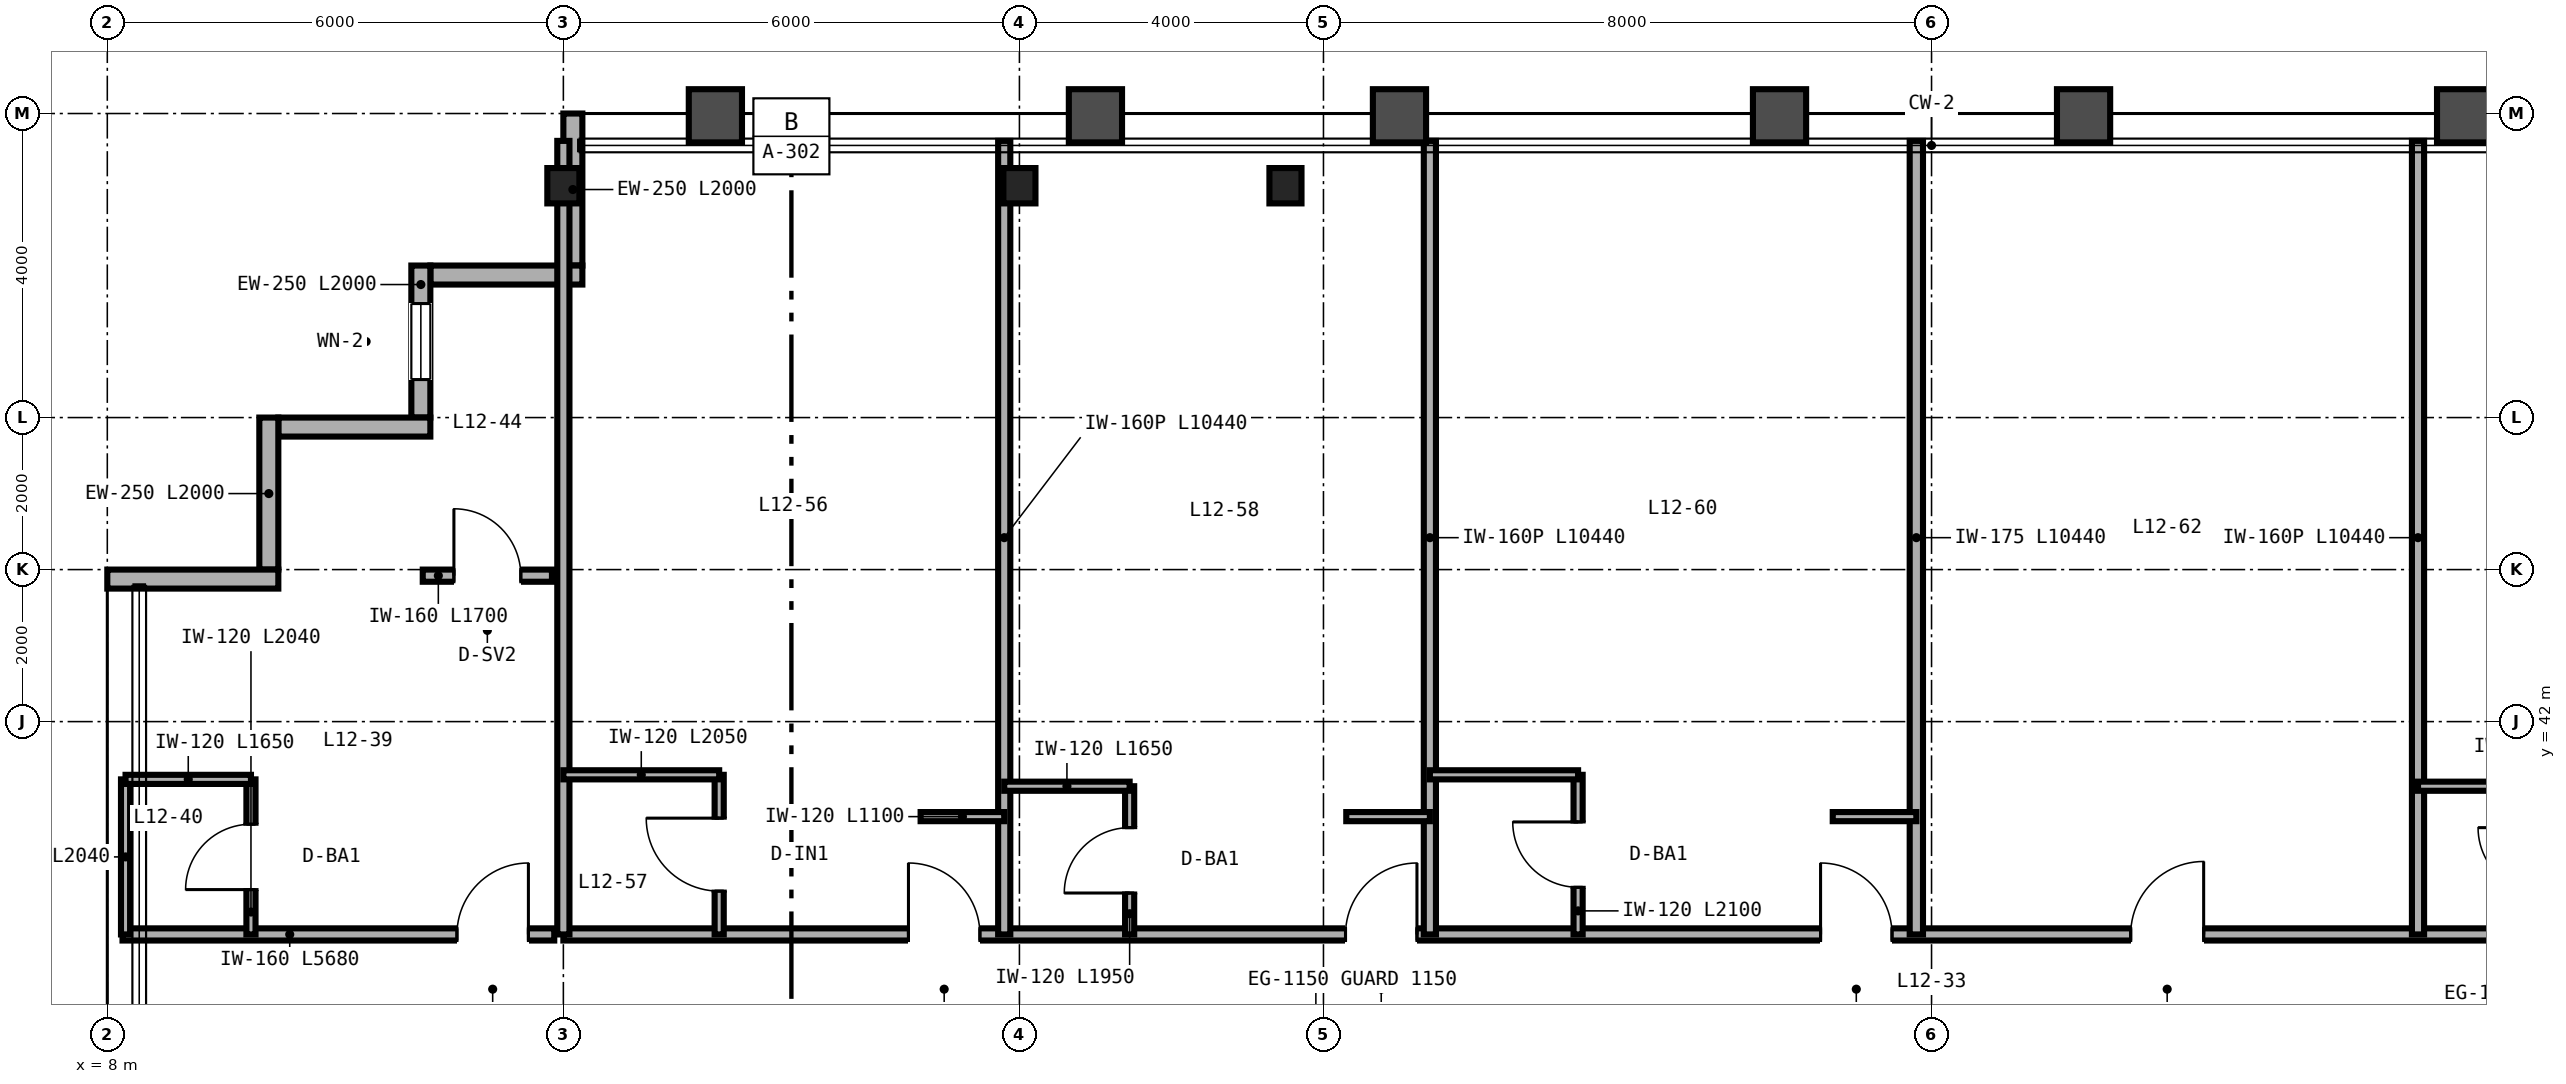
"""IFC4 building model, lengths in metres.
Left out: names, types, materials, properties, quantities, classifications, styles, units other than length and angle.
Written with IfcOpenShell. Run it as: python <this file> out.ifc"""

import sys

from ifc_helpers import new_model, si_unit, direction, frame, frame_2d, origin, origin_2d, place, context, subcontext, project, spatial, rectangle, i_section, extrude, source, transform, mapped, element, fill, save


model = new_model("IFC4")
c1 = context("Model", 3, precision=1e-05, world=origin(), true_north=direction((0.0, 1.0)))
c2 = subcontext(c1, "Body", "Model", "MODEL_VIEW")
j1 = project(units=[si_unit("LENGTHUNIT", "METRE"), si_unit("PLANEANGLEUNIT", "RADIAN")], contexts=[c1])
p1 = place(None, origin())
s1 = spatial("IfcSite", under=j1, at=p1, CompositionType="ELEMENT")
p2 = place(p1, origin())
s2 = spatial("IfcBuilding", under=s1, at=p2, CompositionType="ELEMENT")
p3 = place(p2, frame((0.0, 0.0, 52.8)))
s3 = spatial("IfcBuildingStorey", under=s2, at=p3, CompositionType="ELEMENT", Elevation=52.8)
m1 = source(origin(), c2, "Body", "SweptSolid", [
    extrude(i_section(OverallWidth=0.422, OverallDepth=0.465, WebThickness=0.045, FlangeThickness=0.073, FilletRadius=0.025, at=origin_2d()), origin(), (0.0, 0.0, 1.0), 3.35),
])
for number, where, z_axis, x_axis in (
    (1, (14.0, 49.05, 0.0), (0.0, 0.0, 1.0), (1.0, 0.0, 0.0)),
    (2, (20.0, 49.05, 0.0), (0.0, 0.0, 1.0), (1.0, 0.0, 0.0)),
    (3, (23.5, 49.05, 0.0), (0.0, 0.0, 1.0), (1.0, 0.0, 0.0)),
):
    element("IfcColumn", number, at=place(p3, frame(where, z_axis=z_axis, x_axis=x_axis)), inside=s3, PredefinedType="COLUMN", context=c2, shape_type="MappedRepresentation", body=[
        mapped(m1, transform((0.0, 0.0, 0.0), scale=1.0)),
    ])
p4 = place(p3, frame((14.125, 50.0, 0.0), z_axis=(0.0, 0.0, 1.0), x_axis=(0.0, -1.0, 0.0)))
e4 = element("IfcWall", 4, at=p4, inside=s3, PredefinedType="SOLIDWALL", context=c2, shape_type="SweptSolid", body=[
    extrude(rectangle(XDim=2.0, YDim=0.25, at=frame_2d((1.0, 0.0))), origin(), (0.0, 0.0, 1.0), 2.657),
])
p5 = place(p3, frame((14.25, 47.875, 0.0), z_axis=(0.0, 0.0, 1.0), x_axis=(-1.0, 0.0, 0.0)))
e5 = element("IfcWall", 5, at=p5, inside=s3, PredefinedType="SOLIDWALL", context=c2, shape_type="SweptSolid", body=[
    extrude(rectangle(XDim=2.0, YDim=0.25, at=frame_2d((1.0, 0.0))), origin(), (0.0, 0.0, 1.0), 3.35),
])
p6 = place(p3, frame((12.125, 48.0, 0.0), z_axis=(0.0, 0.0, 1.0), x_axis=(0.0, -1.0, 0.0)))
e6 = element("IfcWall", 6, at=p6, inside=s3, PredefinedType="SOLIDWALL", context=c2, shape_type="SweptSolid", body=[
    extrude(rectangle(XDim=2.0, YDim=0.25, at=frame_2d((1.0, 0.0))), origin(), (0.0, 0.0, 1.0), 3.35),
])
p7 = place(p6, frame((0.5, 0.0, 0.85)))
e7 = element("IfcOpeningElement", 7, at=p7, cuts=e6, PredefinedType="OPENING", context=c2, shape_type="SweptSolid", body=[
    extrude(rectangle(XDim=1.0, YDim=1.9, at=frame_2d((0.5, 0.95))), frame((0.0, 0.135, 0.0), z_axis=(0.0, -1.0, 0.0), x_axis=(1.0, 0.0, 0.0)), (0.0, 0.0, 1.0), 0.27),
])
for number, where, z_axis, x_axis in (
    (8, (12.25, 45.875, 0.0), (0.0, 0.0, 1.0), (-1.0, 0.0, 0.0)),
    (9, (10.125, 46.0, 0.0), (0.0, 0.0, 1.0), (0.0, -1.0, 0.0)),
):
    element("IfcWall", number, at=place(p3, frame(where, z_axis=z_axis, x_axis=x_axis)), inside=s3, PredefinedType="SOLIDWALL", context=c2, shape_type="SweptSolid", body=[
        extrude(rectangle(XDim=2.0, YDim=0.25, at=frame_2d((1.0, 0.0))), origin(), (0.0, 0.0, 1.0), 3.35),
    ])
p8 = place(p3, frame((10.25, 43.875, 0.0), z_axis=(0.0, 0.0, 1.0), x_axis=(-1.0, 0.0, 0.0)))
e10 = element("IfcWall", 10, at=p8, inside=s3, PredefinedType="SOLIDWALL", context=c2, shape_type="SweptSolid", body=[
    extrude(rectangle(XDim=2.25, YDim=0.25, at=frame_2d((1.125, 0.0))), origin(), (0.0, 0.0, 1.0), 3.35),
])
p9 = place(p3, frame((8.2, 39.2, 0.0), z_axis=(0.0, 0.0, 1.0), x_axis=(1.0, 0.0, 0.0)))
e11 = element("IfcWall", 11, at=p9, inside=s3, PredefinedType="PARTITIONING", context=c2, shape_type="SweptSolid", body=[
    extrude(rectangle(XDim=5.68, YDim=0.16, at=frame_2d((2.84, 0.0))), origin(), (0.0, 0.0, 1.0), 3.35),
])
p10 = place(p9, frame((4.4, 0.0, 0.0)))
e12 = element("IfcOpeningElement", 12, at=p10, cuts=e11, PredefinedType="OPENING", context=c2, shape_type="SweptSolid", body=[
    extrude(rectangle(XDim=0.94, YDim=2.15, at=frame_2d((0.47, 1.075))), frame((0.0, 0.09, 0.0), z_axis=(0.0, -1.0, 0.0), x_axis=(1.0, 0.0, 0.0)), (0.0, 0.0, 1.0), 0.18),
])
p11 = place(p3, frame((9.89, 39.2, 0.0), z_axis=(0.0, 0.0, 1.0), x_axis=(0.0, 1.0, 0.0)))
e13 = element("IfcWall", 13, at=p11, inside=s3, PredefinedType="PARTITIONING", context=c2, shape_type="SweptSolid", body=[
    extrude(rectangle(XDim=2.04, YDim=0.12, at=frame_2d((1.02, 0.0))), origin(), (0.0, 0.0, 1.0), 3.35),
])
p12 = place(p11, frame((0.59, 0.0, 0.0)))
e14 = element("IfcOpeningElement", 14, at=p12, cuts=e13, PredefinedType="OPENING", context=c2, shape_type="SweptSolid", body=[
    extrude(rectangle(XDim=0.86, YDim=2.1, at=frame_2d((0.43, 1.05))), frame((0.0, 0.07, 0.0), z_axis=(0.0, -1.0, 0.0), x_axis=(1.0, 0.0, 0.0)), (0.0, 0.0, 1.0), 0.14),
])
p13 = place(p3, frame((8.24, 39.2, 0.0), z_axis=(0.0, 0.0, 1.0), x_axis=(0.0, 1.0, 0.0)))
e15 = element("IfcWall", 15, at=p13, inside=s3, PredefinedType="PARTITIONING", context=c2, shape_type="SweptSolid", body=[
    extrude(rectangle(XDim=2.04, YDim=0.12, at=frame_2d((1.02, 0.0))), origin(), (0.0, 0.0, 1.0), 3.35),
])
p14 = place(p3, frame((8.24, 41.24, 0.0), z_axis=(0.0, 0.0, 1.0), x_axis=(1.0, 0.0, 0.0)))
e16 = element("IfcWall", 16, at=p14, inside=s3, PredefinedType="PARTITIONING", context=c2, shape_type="SweptSolid", body=[
    extrude(rectangle(XDim=1.65, YDim=0.12, at=frame_2d((0.825, 0.0))), origin(), (0.0, 0.0, 1.0), 3.35),
])
p15 = place(p3, frame((12.15, 43.92, 0.0), z_axis=(0.0, 0.0, 1.0), x_axis=(1.0, 0.0, 0.0)))
e17 = element("IfcWall", 17, at=p15, inside=s3, PredefinedType="PARTITIONING", context=c2, shape_type="SweptSolid", body=[
    extrude(rectangle(XDim=1.7, YDim=0.16, at=frame_2d((0.85, 0.0))), origin(), (0.0, 0.0, 1.0), 3.35),
])
p16 = place(p15, frame((0.41, 0.0, 0.0)))
e18 = element("IfcOpeningElement", 18, at=p16, cuts=e17, PredefinedType="OPENING", context=c2, shape_type="SweptSolid", body=[
    extrude(rectangle(XDim=0.88, YDim=2.15, at=frame_2d((0.44, 1.075))), frame((0.0, 0.09, 0.0), z_axis=(0.0, -1.0, 0.0), x_axis=(1.0, 0.0, 0.0)), (0.0, 0.0, 1.0), 0.18),
])
p17 = place(p3, frame((14.0, 39.2, 0.0), z_axis=(0.0, 0.0, 1.0), x_axis=(1.0, 0.0, 0.0)))
e19 = element("IfcWall", 19, at=p17, inside=s3, PredefinedType="PARTITIONING", context=c2, shape_type="SweptSolid", body=[
    extrude(rectangle(XDim=36.0, YDim=0.16, at=frame_2d((18.0, 0.0))), origin(), (0.0, 0.0, 1.0), 2.571),
])
p18 = place(p17, frame((4.54, 0.0, 0.0)))
e20 = element("IfcOpeningElement", 20, at=p18, cuts=e19, PredefinedType="OPENING", context=c2, shape_type="SweptSolid", body=[
    extrude(rectangle(XDim=0.94, YDim=2.15, at=frame_2d((0.47, 1.075))), frame((0.0, 0.09, 0.0), z_axis=(0.0, -1.0, 0.0), x_axis=(1.0, 0.0, 0.0)), (0.0, 0.0, 1.0), 0.18),
])
p19 = place(p17, frame((10.29, 0.0, 0.0)))
e21 = element("IfcOpeningElement", 21, at=p19, cuts=e19, PredefinedType="OPENING", context=c2, shape_type="SweptSolid", body=[
    extrude(rectangle(XDim=0.94, YDim=2.15, at=frame_2d((0.47, 1.075))), frame((0.0, 0.09, 0.0), z_axis=(0.0, -1.0, 0.0), x_axis=(1.0, 0.0, 0.0)), (0.0, 0.0, 1.0), 0.18),
])
p20 = place(p17, frame((16.54, 0.0, 0.0)))
e22 = element("IfcOpeningElement", 22, at=p20, cuts=e19, PredefinedType="OPENING", context=c2, shape_type="SweptSolid", body=[
    extrude(rectangle(XDim=0.94, YDim=2.15, at=frame_2d((0.47, 1.075))), frame((0.0, 0.09, 0.0), z_axis=(0.0, -1.0, 0.0), x_axis=(1.0, 0.0, 0.0)), (0.0, 0.0, 1.0), 0.18),
])
p21 = place(p17, frame((20.62, 0.0, 0.0)))
e23 = element("IfcOpeningElement", 23, at=p21, cuts=e19, PredefinedType="OPENING", context=c2, shape_type="SweptSolid", body=[
    extrude(rectangle(XDim=0.96, YDim=2.15, at=frame_2d((0.48, 1.075))), frame((0.0, 0.09, 0.0), z_axis=(0.0, -1.0, 0.0), x_axis=(1.0, 0.0, 0.0)), (0.0, 0.0, 1.0), 0.18),
])
p22 = place(p17, frame((28.94, 0.0, 0.0)))
e24 = element("IfcOpeningElement", 24, at=p22, cuts=e19, PredefinedType="OPENING", context=c2, shape_type="SweptSolid", body=[
    extrude(rectangle(XDim=0.94, YDim=2.15, at=frame_2d((0.47, 1.075))), frame((0.0, 0.09, 0.0), z_axis=(0.0, -1.0, 0.0), x_axis=(1.0, 0.0, 0.0)), (0.0, 0.0, 1.0), 0.18),
])
p23 = place(p17, frame((34.74, 0.0, 0.0)))
e25 = element("IfcOpeningElement", 25, at=p23, cuts=e19, PredefinedType="OPENING", context=c2, shape_type="SweptSolid", body=[
    extrude(rectangle(XDim=0.94, YDim=2.15, at=frame_2d((0.47, 1.075))), frame((0.0, 0.09, 0.0), z_axis=(0.0, -1.0, 0.0), x_axis=(1.0, 0.0, 0.0)), (0.0, 0.0, 1.0), 0.18),
])
for number, where, z_axis, x_axis in (
    (26, (14.0, 39.2, 0.0), (0.0, 0.0, 1.0), (0.0, 1.0, 0.0)),
    (27, (19.8, 39.2, 0.0), (0.0, 0.0, 1.0), (0.0, 1.0, 0.0)),
):
    element("IfcWall", number, at=place(p3, frame(where, z_axis=z_axis, x_axis=x_axis)), inside=s3, PredefinedType="PARTITIONING", context=c2, shape_type="SweptSolid", body=[
        extrude(rectangle(XDim=10.44, YDim=0.16, at=frame_2d((5.22, 0.0))), origin(), (0.0, 0.0, 1.0), 2.657),
    ])
p24 = place(p3, frame((16.05, 39.2, 0.0), z_axis=(0.0, 0.0, 1.0), x_axis=(0.0, 1.0, 0.0)))
e28 = element("IfcWall", 28, at=p24, inside=s3, PredefinedType="PARTITIONING", context=c2, shape_type="SweptSolid", body=[
    extrude(rectangle(XDim=2.1, YDim=0.12, at=frame_2d((1.05, 0.0))), origin(), (0.0, 0.0, 1.0), 3.35),
])
p25 = place(p24, frame((0.57, 0.0, 0.0)))
e29 = element("IfcOpeningElement", 29, at=p25, cuts=e28, PredefinedType="OPENING", context=c2, shape_type="SweptSolid", body=[
    extrude(rectangle(XDim=0.96, YDim=2.15, at=frame_2d((0.48, 1.075))), frame((0.0, 0.07, 0.0), z_axis=(0.0, -1.0, 0.0), x_axis=(1.0, 0.0, 0.0)), (0.0, 0.0, 1.0), 0.14),
])
p26 = place(p3, frame((14.0, 41.3, 0.0), z_axis=(0.0, 0.0, 1.0), x_axis=(1.0, 0.0, 0.0)))
e30 = element("IfcWall", 30, at=p26, inside=s3, PredefinedType="PARTITIONING", context=c2, shape_type="SweptSolid", body=[
    extrude(rectangle(XDim=2.05, YDim=0.12, at=frame_2d((1.025, 0.0))), origin(), (0.0, 0.0, 1.0), 3.35),
])
p27 = place(p3, frame((18.7, 40.75, 0.0), z_axis=(0.0, 0.0, 1.0), x_axis=(1.0, 0.0, 0.0)))
e31 = element("IfcWall", 31, at=p27, inside=s3, PredefinedType="PARTITIONING", context=c2, shape_type="SweptSolid", body=[
    extrude(rectangle(XDim=1.1, YDim=0.12, at=frame_2d((0.55, 0.0))), origin(), (0.0, 0.0, 1.0), 3.35),
])
p28 = place(p3, frame((25.4, 39.2, 0.0), z_axis=(0.0, 0.0, 1.0), x_axis=(0.0, 1.0, 0.0)))
e32 = element("IfcWall", 32, at=p28, inside=s3, PredefinedType="PARTITIONING", context=c2, shape_type="SweptSolid", body=[
    extrude(rectangle(XDim=10.44, YDim=0.16, at=frame_2d((5.22, 0.0))), origin(), (0.0, 0.0, 1.0), 2.423),
])
p29 = place(p3, frame((21.45, 39.2, 0.0), z_axis=(0.0, 0.0, 1.0), x_axis=(0.0, 1.0, 0.0)))
e33 = element("IfcWall", 33, at=p29, inside=s3, PredefinedType="PARTITIONING", context=c2, shape_type="SweptSolid", body=[
    extrude(rectangle(XDim=1.95, YDim=0.12, at=frame_2d((0.975, 0.0))), origin(), (0.0, 0.0, 1.0), 3.35),
])
p30 = place(p29, frame((0.545, 0.0, 0.0)))
e34 = element("IfcOpeningElement", 34, at=p30, cuts=e33, PredefinedType="OPENING", context=c2, shape_type="SweptSolid", body=[
    extrude(rectangle(XDim=0.86, YDim=2.1, at=frame_2d((0.43, 1.05))), frame((0.0, 0.07, 0.0), z_axis=(0.0, -1.0, 0.0), x_axis=(1.0, 0.0, 0.0)), (0.0, 0.0, 1.0), 0.14),
])
p31 = place(p3, frame((19.8, 41.15, 0.0), z_axis=(0.0, 0.0, 1.0), x_axis=(1.0, 0.0, 0.0)))
e35 = element("IfcWall", 35, at=p31, inside=s3, PredefinedType="PARTITIONING", context=c2, shape_type="SweptSolid", body=[
    extrude(rectangle(XDim=1.65, YDim=0.12, at=frame_2d((0.825, 0.0))), origin(), (0.0, 0.0, 1.0), 3.35),
])
p32 = place(p3, frame((24.3, 40.75, 0.0), z_axis=(0.0, 0.0, 1.0), x_axis=(1.0, 0.0, 0.0)))
e36 = element("IfcWall", 36, at=p32, inside=s3, PredefinedType="PARTITIONING", context=c2, shape_type="SweptSolid", body=[
    extrude(rectangle(XDim=1.1, YDim=0.12, at=frame_2d((0.55, 0.0))), origin(), (0.0, 0.0, 1.0), 3.35),
])
p33 = place(p3, frame((31.8, 39.2, 0.0), z_axis=(0.0, 0.0, 1.0), x_axis=(0.0, 1.0, 0.0)))
e37 = element("IfcWall", 37, at=p33, inside=s3, PredefinedType="PARTITIONING", context=c2, shape_type="SweptSolid", body=[
    extrude(rectangle(XDim=10.44, YDim=0.175, at=frame_2d((5.22, 0.0))), origin(), (0.0, 0.0, 1.0), 2.423),
])
p34 = place(p3, frame((27.35, 39.2, 0.0), z_axis=(0.0, 0.0, 1.0), x_axis=(0.0, 1.0, 0.0)))
e38 = element("IfcWall", 38, at=p34, inside=s3, PredefinedType="PARTITIONING", context=c2, shape_type="SweptSolid", body=[
    extrude(rectangle(XDim=2.1, YDim=0.12, at=frame_2d((1.05, 0.0))), origin(), (0.0, 0.0, 1.0), 3.35),
])
p35 = place(p34, frame((0.62, 0.0, 0.0)))
e39 = element("IfcOpeningElement", 39, at=p35, cuts=e38, PredefinedType="OPENING", context=c2, shape_type="SweptSolid", body=[
    extrude(rectangle(XDim=0.86, YDim=2.1, at=frame_2d((0.43, 1.05))), frame((0.0, 0.07, 0.0), z_axis=(0.0, -1.0, 0.0), x_axis=(1.0, 0.0, 0.0)), (0.0, 0.0, 1.0), 0.14),
])
p36 = place(p3, frame((25.4, 41.3, 0.0), z_axis=(0.0, 0.0, 1.0), x_axis=(1.0, 0.0, 0.0)))
e40 = element("IfcWall", 40, at=p36, inside=s3, PredefinedType="PARTITIONING", context=c2, shape_type="SweptSolid", body=[
    extrude(rectangle(XDim=1.95, YDim=0.12, at=frame_2d((0.975, 0.0))), origin(), (0.0, 0.0, 1.0), 3.35),
])
p37 = place(p3, frame((30.7, 40.75, 0.0), z_axis=(0.0, 0.0, 1.0), x_axis=(1.0, 0.0, 0.0)))
e41 = element("IfcWall", 41, at=p37, inside=s3, PredefinedType="PARTITIONING", context=c2, shape_type="SweptSolid", body=[
    extrude(rectangle(XDim=1.1, YDim=0.12, at=frame_2d((0.55, 0.0))), origin(), (0.0, 0.0, 1.0), 3.35),
])
p38 = place(p3, frame((38.4, 39.2, 0.0), z_axis=(0.0, 0.0, 1.0), x_axis=(0.0, 1.0, 0.0)))
e42 = element("IfcWall", 42, at=p38, inside=s3, PredefinedType="PARTITIONING", context=c2, shape_type="SweptSolid", body=[
    extrude(rectangle(XDim=10.44, YDim=0.16, at=frame_2d((5.22, 0.0))), origin(), (0.0, 0.0, 1.0), 2.423),
])
p39 = place(p3, frame((38.4, 41.15, 0.0), z_axis=(0.0, 0.0, 1.0), x_axis=(1.0, 0.0, 0.0)))
e43 = element("IfcWall", 43, at=p39, inside=s3, PredefinedType="PARTITIONING", context=c2, shape_type="SweptSolid", body=[
    extrude(rectangle(XDim=1.65, YDim=0.12, at=frame_2d((0.825, 0.0))), origin(), (0.0, 0.0, 1.0), 3.35),
])
m2 = source(origin(), c2, "Body", "SweptSolid", [
    extrude(rectangle(XDim=1.0, YDim=1.9, at=frame_2d((0.5, 0.95))), frame((0.0, 0.03, 0.0), z_axis=(0.0, -1.0, 0.0), x_axis=(1.0, 0.0, 0.0)), (0.0, 0.0, 1.0), 0.06),
])
p40 = place(p7, origin())
e44 = element("IfcWindow", 44, at=p40, inside=s3, PartitioningType="SINGLE_PANEL", PredefinedType="WINDOW", context=c2, shape_type="MappedRepresentation", body=[
    mapped(m2, transform((0.0, 0.0, 0.0), scale=1.0)),
])
fill(e7, e44)
m3 = source(origin(), c2, "Body", "SweptSolid", [
    extrude(rectangle(XDim=0.86, YDim=2.1, at=frame_2d((0.43, 1.05))), frame((0.0, 0.025, 0.0), z_axis=(0.0, -1.0, 0.0), x_axis=(1.0, 0.0, 0.0)), (0.0, 0.0, 1.0), 0.05),
])
p41 = place(p12, origin())
e45 = element("IfcDoor", 45, at=p41, inside=s3, OperationType="SINGLE_SWING_LEFT", PredefinedType="DOOR", context=c2, shape_type="MappedRepresentation", body=[
    mapped(m3, transform((0.0, 0.0, 0.0), scale=1.0)),
])
fill(e14, e45)
m4 = source(origin(), c2, "Body", "SweptSolid", [
    extrude(rectangle(XDim=0.94, YDim=2.15, at=frame_2d((0.47, 1.075))), frame((0.0, 0.025, 0.0), z_axis=(0.0, -1.0, 0.0), x_axis=(1.0, 0.0, 0.0)), (0.0, 0.0, 1.0), 0.05),
])
p42 = place(p10, origin())
e46 = element("IfcDoor", 46, at=p42, inside=s3, OperationType="SINGLE_SWING_RIGHT", PredefinedType="DOOR", context=c2, shape_type="MappedRepresentation", body=[
    mapped(m4, transform((0.0, 0.0, 0.0), scale=1.0)),
])
fill(e12, e46)
m5 = source(origin(), c2, "Body", "SweptSolid", [
    extrude(rectangle(XDim=0.88, YDim=2.15, at=frame_2d((0.44, 1.075))), frame((0.0, 0.025, 0.0), z_axis=(0.0, -1.0, 0.0), x_axis=(1.0, 0.0, 0.0)), (0.0, 0.0, 1.0), 0.05),
])
p43 = place(p16, origin())
e47 = element("IfcDoor", 47, at=p43, inside=s3, OperationType="SINGLE_SWING_LEFT", PredefinedType="DOOR", context=c2, shape_type="MappedRepresentation", body=[
    mapped(m5, transform((0.0, 0.0, 0.0), scale=1.0)),
])
fill(e18, e47)
m6 = source(origin(), c2, "Body", "SweptSolid", [
    extrude(rectangle(XDim=0.96, YDim=2.15, at=frame_2d((0.48, 1.075))), frame((0.0, 0.025, 0.0), z_axis=(0.0, -1.0, 0.0), x_axis=(1.0, 0.0, 0.0)), (0.0, 0.0, 1.0), 0.05),
])
p44 = place(p25, origin())
e48 = element("IfcDoor", 48, at=p44, inside=s3, OperationType="SINGLE_SWING_RIGHT", PredefinedType="DOOR", context=c2, shape_type="MappedRepresentation", body=[
    mapped(m6, transform((0.0, 0.0, 0.0), scale=1.0)),
])
fill(e29, e48)
p45 = place(p30, origin())
e49 = element("IfcDoor", 49, at=p45, inside=s3, OperationType="SINGLE_SWING_LEFT", PredefinedType="DOOR", context=c2, shape_type="MappedRepresentation", body=[
    mapped(m3, transform((0.0, 0.0, 0.0), scale=1.0)),
])
fill(e34, e49)
p46 = place(p35, origin())
e50 = element("IfcDoor", 50, at=p46, inside=s3, OperationType="SINGLE_SWING_RIGHT", PredefinedType="DOOR", context=c2, shape_type="MappedRepresentation", body=[
    mapped(m3, transform((0.0, 0.0, 0.0), scale=1.0)),
])
fill(e39, e50)
p47 = place(p18, origin())
e51 = element("IfcDoor", 51, at=p47, inside=s3, OperationType="SINGLE_SWING_LEFT", PredefinedType="DOOR", context=c2, shape_type="MappedRepresentation", body=[
    mapped(m4, transform((0.0, 0.0, 0.0), scale=1.0)),
])
fill(e20, e51)
p48 = place(p19, origin())
e52 = element("IfcDoor", 52, at=p48, inside=s3, OperationType="SINGLE_SWING_RIGHT", PredefinedType="DOOR", context=c2, shape_type="MappedRepresentation", body=[
    mapped(m4, transform((0.0, 0.0, 0.0), scale=1.0)),
])
fill(e21, e52)
p49 = place(p20, origin())
e53 = element("IfcDoor", 53, at=p49, inside=s3, OperationType="SINGLE_SWING_LEFT", PredefinedType="DOOR", context=c2, shape_type="MappedRepresentation", body=[
    mapped(m4, transform((0.0, 0.0, 0.0), scale=1.0)),
])
fill(e22, e53)
p50 = place(p21, origin())
e54 = element("IfcDoor", 54, at=p50, inside=s3, OperationType="SINGLE_SWING_RIGHT", PredefinedType="DOOR", context=c2, shape_type="MappedRepresentation", body=[
    mapped(m6, transform((0.0, 0.0, 0.0), scale=1.0)),
])
fill(e23, e54)
save(model, sys.argv[1])
